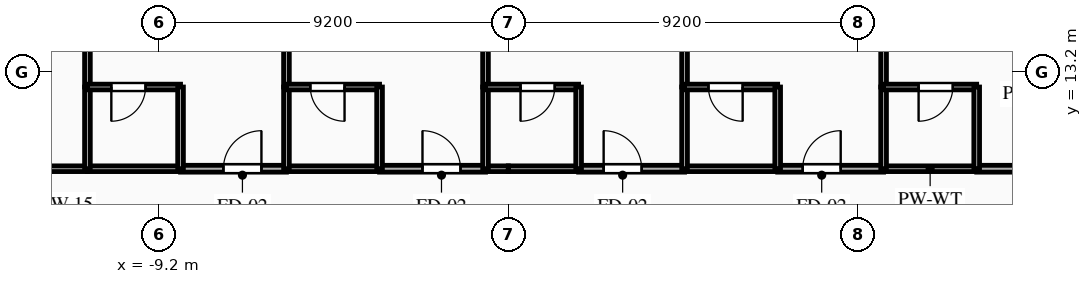
"""IFC4 building model, lengths in metres.
Left out: names, types, materials, properties, quantities, classifications, styles, units other than length and angle.
Written with IfcOpenShell. Run it as: python <this file> out.ifc"""

import sys

from ifc_helpers import new_model, si_unit, direction, frame, frame_2d, origin, place, context, subcontext, project, spatial, rectangle, extrude, element, fill, save


model = new_model("IFC4")
c1 = context("Model", 3, precision=1e-05, world=origin(), true_north=direction((0.0, 1.0)))
c2 = subcontext(c1, "Body", "Model", "MODEL_VIEW")
j1 = project(units=[si_unit("LENGTHUNIT", "METRE"), si_unit("PLANEANGLEUNIT", "RADIAN")], contexts=[c1])
p1 = place(None, origin())
s1 = spatial("IfcSite", under=j1, at=p1, CompositionType="ELEMENT")
p2 = place(p1, origin())
s2 = spatial("IfcBuilding", under=s1, at=p2, CompositionType="ELEMENT")
p3 = place(p2, frame((0.0, 0.0, 144.4)))
s3 = spatial("IfcBuildingStorey", under=s2, at=p3, CompositionType="ELEMENT", Elevation=144.4)
p4 = place(p3, frame((-14.112, 10.65, 0.0), z_axis=(0.0, 0.0, 1.0), x_axis=(1.0, 0.0, 0.0)))
e1 = element("IfcWall", 1, at=p4, inside=s3, PredefinedType="PARTITIONING", context=c2, shape_type="SweptSolid", body=[
    extrude(rectangle(XDim=3.037, YDim=0.15, at=frame_2d((1.519, 0.0))), origin(), (0.0, 0.0, 1.0), 3.04),
])
p5 = place(p4, frame((0.696, 0.0, 0.0)))
e2 = element("IfcOpeningElement", 2, at=p5, cuts=e1, PredefinedType="OPENING", context=c2, shape_type="SweptSolid", body=[
    extrude(rectangle(XDim=0.95, YDim=2.1, at=frame_2d((0.475, 1.05))), frame((0.0, 0.085, 0.0), z_axis=(0.0, -1.0, 0.0), x_axis=(1.0, 0.0, 0.0)), (0.0, 0.0, 1.0), 0.17),
])
p6 = place(p3, frame((-8.625, 10.65, 0.0), z_axis=(0.0, 0.0, 1.0), x_axis=(1.0, 0.0, 0.0)))
e3 = element("IfcWall", 3, at=p6, inside=s3, PredefinedType="PARTITIONING", context=c2, shape_type="SweptSolid", body=[
    extrude(rectangle(XDim=2.787, YDim=0.18, at=frame_2d((1.394, 0.0))), origin(), (0.0, 0.0, 1.0), 3.04),
])
p7 = place(p6, frame((1.129, 0.0, 0.0)))
e4 = element("IfcOpeningElement", 4, at=p7, cuts=e3, PredefinedType="OPENING", context=c2, shape_type="SweptSolid", body=[
    extrude(rectangle(XDim=1.0, YDim=2.15, at=frame_2d((0.5, 1.075))), frame((0.0, 0.1, 0.0), z_axis=(0.0, -1.0, 0.0), x_axis=(1.0, 0.0, 0.0)), (0.0, 0.0, 1.0), 0.2),
])
p8 = place(p3, frame((-11.075, 10.65, 0.0), z_axis=(0.0, 0.0, 1.0), x_axis=(1.0, 0.0, 0.0)))
e5 = element("IfcWall", 5, at=p8, inside=s3, PredefinedType="PLUMBINGWALL", context=c2, shape_type="SweptSolid", body=[
    extrude(rectangle(XDim=2.45, YDim=0.15, at=frame_2d((1.225, 0.0))), origin(), (0.0, 0.0, 1.0), 3.04),
])
p9 = place(p3, frame((-3.388, 10.65, 0.0), z_axis=(0.0, 0.0, 1.0), x_axis=(1.0, 0.0, 0.0)))
e6 = element("IfcWall", 6, at=p9, inside=s3, PredefinedType="PARTITIONING", context=c2, shape_type="SweptSolid", body=[
    extrude(rectangle(XDim=2.788, YDim=0.18, at=frame_2d((1.394, 0.0))), origin(), (0.0, 0.0, 1.0), 3.04),
])
p10 = place(p9, frame((1.129, 0.0, 0.0)))
e7 = element("IfcOpeningElement", 7, at=p10, cuts=e6, PredefinedType="OPENING", context=c2, shape_type="SweptSolid", body=[
    extrude(rectangle(XDim=1.0, YDim=2.15, at=frame_2d((0.5, 1.075))), frame((0.0, 0.1, 0.0), z_axis=(0.0, -1.0, 0.0), x_axis=(1.0, 0.0, 0.0)), (0.0, 0.0, 1.0), 0.2),
])
p11 = place(p3, frame((-5.838, 10.65, 0.0), z_axis=(0.0, 0.0, 1.0), x_axis=(1.0, 0.0, 0.0)))
e8 = element("IfcWall", 8, at=p11, inside=s3, PredefinedType="PLUMBINGWALL", context=c2, shape_type="SweptSolid", body=[
    extrude(rectangle(XDim=2.45, YDim=0.15, at=frame_2d((1.225, 0.0))), origin(), (0.0, 0.0, 1.0), 3.04),
])
p12 = place(p3, frame((-0.6, 10.65, 0.0), z_axis=(0.0, 0.0, 1.0), x_axis=(1.0, 0.0, 0.0)))
e9 = element("IfcWall", 9, at=p12, inside=s3, PredefinedType="PLUMBINGWALL", context=c2, shape_type="SweptSolid", body=[
    extrude(rectangle(XDim=0.6, YDim=0.15, at=frame_2d((0.3, 0.0))), origin(), (0.0, 0.0, 1.0), 3.04),
])
p13 = place(p3, frame((1.85, 10.65, 0.0), z_axis=(0.0, 0.0, 1.0), x_axis=(1.0, 0.0, 0.0)))
e10 = element("IfcWall", 10, at=p13, inside=s3, PredefinedType="PARTITIONING", context=c2, shape_type="SweptSolid", body=[
    extrude(rectangle(XDim=2.788, YDim=0.18, at=frame_2d((1.394, 0.0))), origin(), (0.0, 0.0, 1.0), 3.04),
])
p14 = place(p13, frame((0.658, 0.0, 0.0)))
e11 = element("IfcOpeningElement", 11, at=p14, cuts=e10, PredefinedType="OPENING", context=c2, shape_type="SweptSolid", body=[
    extrude(rectangle(XDim=1.0, YDim=2.15, at=frame_2d((0.5, 1.075))), frame((0.0, 0.1, 0.0), z_axis=(0.0, -1.0, 0.0), x_axis=(1.0, 0.0, 0.0)), (0.0, 0.0, 1.0), 0.2),
])
p15 = place(p3, frame((0.0, 10.65, 0.0), z_axis=(0.0, 0.0, 1.0), x_axis=(1.0, 0.0, 0.0)))
e12 = element("IfcWall", 12, at=p15, inside=s3, PredefinedType="PLUMBINGWALL", context=c2, shape_type="SweptSolid", body=[
    extrude(rectangle(XDim=1.85, YDim=0.15, at=frame_2d((0.925, 0.0))), origin(), (0.0, 0.0, 1.0), 3.04),
])
p16 = place(p3, frame((7.088, 10.65, 0.0), z_axis=(0.0, 0.0, 1.0), x_axis=(1.0, 0.0, 0.0)))
e13 = element("IfcWall", 13, at=p16, inside=s3, PredefinedType="PARTITIONING", context=c2, shape_type="SweptSolid", body=[
    extrude(rectangle(XDim=2.787, YDim=0.18, at=frame_2d((1.394, 0.0))), origin(), (0.0, 0.0, 1.0), 3.04),
])
p17 = place(p16, frame((0.658, 0.0, 0.0)))
e14 = element("IfcOpeningElement", 14, at=p17, cuts=e13, PredefinedType="OPENING", context=c2, shape_type="SweptSolid", body=[
    extrude(rectangle(XDim=1.0, YDim=2.15, at=frame_2d((0.5, 1.075))), frame((0.0, 0.1, 0.0), z_axis=(0.0, -1.0, 0.0), x_axis=(1.0, 0.0, 0.0)), (0.0, 0.0, 1.0), 0.2),
])
p18 = place(p3, frame((4.638, 10.65, 0.0), z_axis=(0.0, 0.0, 1.0), x_axis=(1.0, 0.0, 0.0)))
e15 = element("IfcWall", 15, at=p18, inside=s3, PredefinedType="PLUMBINGWALL", context=c2, shape_type="SweptSolid", body=[
    extrude(rectangle(XDim=2.45, YDim=0.15, at=frame_2d((1.225, 0.0))), origin(), (0.0, 0.0, 1.0), 3.04),
])
p19 = place(p3, frame((12.325, 10.65, 0.0), z_axis=(0.0, 0.0, 1.0), x_axis=(1.0, 0.0, 0.0)))
e16 = element("IfcWall", 16, at=p19, inside=s3, PredefinedType="PARTITIONING", context=c2, shape_type="SweptSolid", body=[
    extrude(rectangle(XDim=2.788, YDim=0.18, at=frame_2d((1.394, 0.0))), origin(), (0.0, 0.0, 1.0), 3.04),
])
p20 = place(p19, frame((1.129, 0.0, 0.0)))
e17 = element("IfcOpeningElement", 17, at=p20, cuts=e16, PredefinedType="OPENING", context=c2, shape_type="SweptSolid", body=[
    extrude(rectangle(XDim=1.0, YDim=2.15, at=frame_2d((0.5, 1.075))), frame((0.0, 0.1, 0.0), z_axis=(0.0, -1.0, 0.0), x_axis=(1.0, 0.0, 0.0)), (0.0, 0.0, 1.0), 0.2),
])
p21 = place(p3, frame((9.875, 10.65, 0.0), z_axis=(0.0, 0.0, 1.0), x_axis=(1.0, 0.0, 0.0)))
e18 = element("IfcWall", 18, at=p21, inside=s3, PredefinedType="PLUMBINGWALL", context=c2, shape_type="SweptSolid", body=[
    extrude(rectangle(XDim=2.45, YDim=0.15, at=frame_2d((1.225, 0.0))), origin(), (0.0, 0.0, 1.0), 3.04),
])
p22 = place(p3, frame((-11.075, 20.4, 0.0), z_axis=(0.0, 0.0, 1.0), x_axis=(0.0, -1.0, 0.0)))
e19 = element("IfcWall", 19, at=p22, inside=s3, PredefinedType="PARTITIONING", context=c2, shape_type="SweptSolid", body=[
    extrude(rectangle(XDim=7.6, YDim=0.15, at=frame_2d((3.8, 0.0))), origin(), (0.0, 0.0, 1.0), 3.04),
])
p23 = place(p3, frame((-11.075, 12.8, 0.0), z_axis=(0.0, 0.0, 1.0), x_axis=(0.0, -1.0, 0.0)))
e20 = element("IfcWall", 20, at=p23, inside=s3, PredefinedType="PLUMBINGWALL", context=c2, shape_type="SweptSolid", body=[
    extrude(rectangle(XDim=2.15, YDim=0.15, at=frame_2d((1.075, 0.0))), origin(), (0.0, 0.0, 1.0), 3.04),
])
p24 = place(p3, frame((-8.625, 12.8, 0.0), z_axis=(0.0, 0.0, 1.0), x_axis=(-1.0, 0.0, 0.0)))
e21 = element("IfcWall", 21, at=p24, inside=s3, PredefinedType="PLUMBINGWALL", context=c2, shape_type="SweptSolid", body=[
    extrude(rectangle(XDim=2.45, YDim=0.15, at=frame_2d((1.225, 0.0))), origin(), (0.0, 0.0, 1.0), 3.04),
])
p25 = place(p24, frame((0.921, 0.0, 0.0)))
e22 = element("IfcOpeningElement", 22, at=p25, cuts=e21, PredefinedType="OPENING", context=c2, shape_type="SweptSolid", body=[
    extrude(rectangle(XDim=0.9, YDim=2.1, at=frame_2d((0.45, 1.05))), frame((0.0, 0.085, 0.0), z_axis=(0.0, -1.0, 0.0), x_axis=(1.0, 0.0, 0.0)), (0.0, 0.0, 1.0), 0.17),
])
p26 = place(p3, frame((-8.625, 10.65, 0.0), z_axis=(0.0, 0.0, 1.0), x_axis=(0.0, 1.0, 0.0)))
e23 = element("IfcWall", 23, at=p26, inside=s3, PredefinedType="PLUMBINGWALL", context=c2, shape_type="SweptSolid", body=[
    extrude(rectangle(XDim=2.15, YDim=0.15, at=frame_2d((1.075, 0.0))), origin(), (0.0, 0.0, 1.0), 3.04),
])
p27 = place(p3, frame((-5.838, 20.4, 0.0), z_axis=(0.0, 0.0, 1.0), x_axis=(0.0, -1.0, 0.0)))
e24 = element("IfcWall", 24, at=p27, inside=s3, PredefinedType="PARTITIONING", context=c2, shape_type="SweptSolid", body=[
    extrude(rectangle(XDim=7.6, YDim=0.15, at=frame_2d((3.8, 0.0))), origin(), (0.0, 0.0, 1.0), 3.04),
])
p28 = place(p3, frame((-5.838, 12.8, 0.0), z_axis=(0.0, 0.0, 1.0), x_axis=(0.0, -1.0, 0.0)))
e25 = element("IfcWall", 25, at=p28, inside=s3, PredefinedType="PLUMBINGWALL", context=c2, shape_type="SweptSolid", body=[
    extrude(rectangle(XDim=2.15, YDim=0.15, at=frame_2d((1.075, 0.0))), origin(), (0.0, 0.0, 1.0), 3.04),
])
p29 = place(p3, frame((-3.388, 12.8, 0.0), z_axis=(0.0, 0.0, 1.0), x_axis=(-1.0, 0.0, 0.0)))
e26 = element("IfcWall", 26, at=p29, inside=s3, PredefinedType="PLUMBINGWALL", context=c2, shape_type="SweptSolid", body=[
    extrude(rectangle(XDim=2.45, YDim=0.15, at=frame_2d((1.225, 0.0))), origin(), (0.0, 0.0, 1.0), 3.04),
])
p30 = place(p29, frame((0.921, 0.0, 0.0)))
e27 = element("IfcOpeningElement", 27, at=p30, cuts=e26, PredefinedType="OPENING", context=c2, shape_type="SweptSolid", body=[
    extrude(rectangle(XDim=0.9, YDim=2.1, at=frame_2d((0.45, 1.05))), frame((0.0, 0.085, 0.0), z_axis=(0.0, -1.0, 0.0), x_axis=(1.0, 0.0, 0.0)), (0.0, 0.0, 1.0), 0.17),
])
p31 = place(p3, frame((-3.388, 10.65, 0.0), z_axis=(0.0, 0.0, 1.0), x_axis=(0.0, 1.0, 0.0)))
e28 = element("IfcWall", 28, at=p31, inside=s3, PredefinedType="PLUMBINGWALL", context=c2, shape_type="SweptSolid", body=[
    extrude(rectangle(XDim=2.15, YDim=0.15, at=frame_2d((1.075, 0.0))), origin(), (0.0, 0.0, 1.0), 3.04),
])
p32 = place(p3, frame((-0.6, 20.4, 0.0), z_axis=(0.0, 0.0, 1.0), x_axis=(0.0, -1.0, 0.0)))
e29 = element("IfcWall", 29, at=p32, inside=s3, PredefinedType="PARTITIONING", context=c2, shape_type="SweptSolid", body=[
    extrude(rectangle(XDim=7.6, YDim=0.15, at=frame_2d((3.8, 0.0))), origin(), (0.0, 0.0, 1.0), 3.04),
])
p33 = place(p3, frame((-0.6, 12.8, 0.0), z_axis=(0.0, 0.0, 1.0), x_axis=(0.0, -1.0, 0.0)))
e30 = element("IfcWall", 30, at=p33, inside=s3, PredefinedType="PLUMBINGWALL", context=c2, shape_type="SweptSolid", body=[
    extrude(rectangle(XDim=2.15, YDim=0.15, at=frame_2d((1.075, 0.0))), origin(), (0.0, 0.0, 1.0), 3.04),
])
p34 = place(p3, frame((1.85, 12.8, 0.0), z_axis=(0.0, 0.0, 1.0), x_axis=(-1.0, 0.0, 0.0)))
e31 = element("IfcWall", 31, at=p34, inside=s3, PredefinedType="PLUMBINGWALL", context=c2, shape_type="SweptSolid", body=[
    extrude(rectangle(XDim=2.45, YDim=0.15, at=frame_2d((1.225, 0.0))), origin(), (0.0, 0.0, 1.0), 3.04),
])
p35 = place(p34, frame((0.629, 0.0, 0.0)))
e32 = element("IfcOpeningElement", 32, at=p35, cuts=e31, PredefinedType="OPENING", context=c2, shape_type="SweptSolid", body=[
    extrude(rectangle(XDim=0.9, YDim=2.1, at=frame_2d((0.45, 1.05))), frame((0.0, 0.085, 0.0), z_axis=(0.0, -1.0, 0.0), x_axis=(1.0, 0.0, 0.0)), (0.0, 0.0, 1.0), 0.17),
])
p36 = place(p3, frame((1.85, 10.65, 0.0), z_axis=(0.0, 0.0, 1.0), x_axis=(0.0, 1.0, 0.0)))
e33 = element("IfcWall", 33, at=p36, inside=s3, PredefinedType="PLUMBINGWALL", context=c2, shape_type="SweptSolid", body=[
    extrude(rectangle(XDim=2.15, YDim=0.15, at=frame_2d((1.075, 0.0))), origin(), (0.0, 0.0, 1.0), 3.04),
])
p37 = place(p3, frame((4.638, 20.4, 0.0), z_axis=(0.0, 0.0, 1.0), x_axis=(0.0, -1.0, 0.0)))
e34 = element("IfcWall", 34, at=p37, inside=s3, PredefinedType="PARTITIONING", context=c2, shape_type="SweptSolid", body=[
    extrude(rectangle(XDim=7.6, YDim=0.15, at=frame_2d((3.8, 0.0))), origin(), (0.0, 0.0, 1.0), 3.04),
])
p38 = place(p3, frame((4.638, 12.8, 0.0), z_axis=(0.0, 0.0, 1.0), x_axis=(0.0, -1.0, 0.0)))
e35 = element("IfcWall", 35, at=p38, inside=s3, PredefinedType="PLUMBINGWALL", context=c2, shape_type="SweptSolid", body=[
    extrude(rectangle(XDim=2.15, YDim=0.15, at=frame_2d((1.075, 0.0))), origin(), (0.0, 0.0, 1.0), 3.04),
])
p39 = place(p3, frame((7.088, 12.8, 0.0), z_axis=(0.0, 0.0, 1.0), x_axis=(-1.0, 0.0, 0.0)))
e36 = element("IfcWall", 36, at=p39, inside=s3, PredefinedType="PLUMBINGWALL", context=c2, shape_type="SweptSolid", body=[
    extrude(rectangle(XDim=2.45, YDim=0.15, at=frame_2d((1.225, 0.0))), origin(), (0.0, 0.0, 1.0), 3.04),
])
p40 = place(p39, frame((0.921, 0.0, 0.0)))
e37 = element("IfcOpeningElement", 37, at=p40, cuts=e36, PredefinedType="OPENING", context=c2, shape_type="SweptSolid", body=[
    extrude(rectangle(XDim=0.9, YDim=2.1, at=frame_2d((0.45, 1.05))), frame((0.0, 0.085, 0.0), z_axis=(0.0, -1.0, 0.0), x_axis=(1.0, 0.0, 0.0)), (0.0, 0.0, 1.0), 0.17),
])
p41 = place(p3, frame((7.088, 10.65, 0.0), z_axis=(0.0, 0.0, 1.0), x_axis=(0.0, 1.0, 0.0)))
e38 = element("IfcWall", 38, at=p41, inside=s3, PredefinedType="PLUMBINGWALL", context=c2, shape_type="SweptSolid", body=[
    extrude(rectangle(XDim=2.15, YDim=0.15, at=frame_2d((1.075, 0.0))), origin(), (0.0, 0.0, 1.0), 3.04),
])
p42 = place(p3, frame((9.875, 20.4, 0.0), z_axis=(0.0, 0.0, 1.0), x_axis=(0.0, -1.0, 0.0)))
e39 = element("IfcWall", 39, at=p42, inside=s3, PredefinedType="PARTITIONING", context=c2, shape_type="SweptSolid", body=[
    extrude(rectangle(XDim=7.6, YDim=0.15, at=frame_2d((3.8, 0.0))), origin(), (0.0, 0.0, 1.0), 3.04),
])
p43 = place(p3, frame((9.875, 12.8, 0.0), z_axis=(0.0, 0.0, 1.0), x_axis=(0.0, -1.0, 0.0)))
e40 = element("IfcWall", 40, at=p43, inside=s3, PredefinedType="PLUMBINGWALL", context=c2, shape_type="SweptSolid", body=[
    extrude(rectangle(XDim=2.15, YDim=0.15, at=frame_2d((1.075, 0.0))), origin(), (0.0, 0.0, 1.0), 3.04),
])
p44 = place(p3, frame((12.325, 12.8, 0.0), z_axis=(0.0, 0.0, 1.0), x_axis=(-1.0, 0.0, 0.0)))
e41 = element("IfcWall", 41, at=p44, inside=s3, PredefinedType="PLUMBINGWALL", context=c2, shape_type="SweptSolid", body=[
    extrude(rectangle(XDim=2.45, YDim=0.15, at=frame_2d((1.225, 0.0))), origin(), (0.0, 0.0, 1.0), 3.04),
])
p45 = place(p44, frame((0.629, 0.0, 0.0)))
e42 = element("IfcOpeningElement", 42, at=p45, cuts=e41, PredefinedType="OPENING", context=c2, shape_type="SweptSolid", body=[
    extrude(rectangle(XDim=0.9, YDim=2.1, at=frame_2d((0.45, 1.05))), frame((0.0, 0.085, 0.0), z_axis=(0.0, -1.0, 0.0), x_axis=(1.0, 0.0, 0.0)), (0.0, 0.0, 1.0), 0.17),
])
p46 = place(p3, frame((12.325, 10.65, 0.0), z_axis=(0.0, 0.0, 1.0), x_axis=(0.0, 1.0, 0.0)))
e43 = element("IfcWall", 43, at=p46, inside=s3, PredefinedType="PLUMBINGWALL", context=c2, shape_type="SweptSolid", body=[
    extrude(rectangle(XDim=2.15, YDim=0.15, at=frame_2d((1.075, 0.0))), origin(), (0.0, 0.0, 1.0), 3.04),
])
p47 = place(p7, origin())
e44 = element("IfcDoor", 44, at=p47, inside=s3, OperationType="SINGLE_SWING_RIGHT", PredefinedType="DOOR", context=c2, shape_type="SweptSolid", body=[
    extrude(rectangle(XDim=1.0, YDim=2.15, at=frame_2d((0.5, 1.075))), frame((0.0, 0.025, 0.0), z_axis=(0.0, -1.0, 0.0), x_axis=(1.0, 0.0, 0.0)), (0.0, 0.0, 1.0), 0.05),
])
fill(e4, e44)
p48 = place(p10, origin())
e45 = element("IfcDoor", 45, at=p48, inside=s3, OperationType="SINGLE_SWING_LEFT", PredefinedType="DOOR", context=c2, shape_type="SweptSolid", body=[
    extrude(rectangle(XDim=1.0, YDim=2.15, at=frame_2d((0.5, 1.075))), frame((0.0, 0.025, 0.0), z_axis=(0.0, -1.0, 0.0), x_axis=(1.0, 0.0, 0.0)), (0.0, 0.0, 1.0), 0.05),
])
fill(e7, e45)
p49 = place(p14, origin())
e46 = element("IfcDoor", 46, at=p49, inside=s3, OperationType="SINGLE_SWING_LEFT", PredefinedType="DOOR", context=c2, shape_type="SweptSolid", body=[
    extrude(rectangle(XDim=1.0, YDim=2.15, at=frame_2d((0.5, 1.075))), frame((0.0, 0.025, 0.0), z_axis=(0.0, -1.0, 0.0), x_axis=(1.0, 0.0, 0.0)), (0.0, 0.0, 1.0), 0.05),
])
fill(e11, e46)
p50 = place(p17, origin())
e47 = element("IfcDoor", 47, at=p50, inside=s3, OperationType="SINGLE_SWING_RIGHT", PredefinedType="DOOR", context=c2, shape_type="SweptSolid", body=[
    extrude(rectangle(XDim=1.0, YDim=2.15, at=frame_2d((0.5, 1.075))), frame((0.0, 0.025, 0.0), z_axis=(0.0, -1.0, 0.0), x_axis=(1.0, 0.0, 0.0)), (0.0, 0.0, 1.0), 0.05),
])
fill(e14, e47)
p51 = place(p25, origin())
e48 = element("IfcDoor", 48, at=p51, inside=s3, OperationType="SINGLE_SWING_RIGHT", PredefinedType="DOOR", context=c2, shape_type="SweptSolid", body=[
    extrude(rectangle(XDim=0.9, YDim=2.1, at=frame_2d((0.45, 1.05))), frame((0.0, 0.025, 0.0), z_axis=(0.0, -1.0, 0.0), x_axis=(1.0, 0.0, 0.0)), (0.0, 0.0, 1.0), 0.05),
])
fill(e22, e48)
p52 = place(p30, origin())
e49 = element("IfcDoor", 49, at=p52, inside=s3, OperationType="SINGLE_SWING_LEFT", PredefinedType="DOOR", context=c2, shape_type="SweptSolid", body=[
    extrude(rectangle(XDim=0.9, YDim=2.1, at=frame_2d((0.45, 1.05))), frame((0.0, 0.025, 0.0), z_axis=(0.0, -1.0, 0.0), x_axis=(1.0, 0.0, 0.0)), (0.0, 0.0, 1.0), 0.05),
])
fill(e27, e49)
p53 = place(p35, origin())
e50 = element("IfcDoor", 50, at=p53, inside=s3, OperationType="SINGLE_SWING_RIGHT", PredefinedType="DOOR", context=c2, shape_type="SweptSolid", body=[
    extrude(rectangle(XDim=0.9, YDim=2.1, at=frame_2d((0.45, 1.05))), frame((0.0, 0.025, 0.0), z_axis=(0.0, -1.0, 0.0), x_axis=(1.0, 0.0, 0.0)), (0.0, 0.0, 1.0), 0.05),
])
fill(e32, e50)
p54 = place(p40, origin())
e51 = element("IfcDoor", 51, at=p54, inside=s3, OperationType="SINGLE_SWING_LEFT", PredefinedType="DOOR", context=c2, shape_type="SweptSolid", body=[
    extrude(rectangle(XDim=0.9, YDim=2.1, at=frame_2d((0.45, 1.05))), frame((0.0, 0.025, 0.0), z_axis=(0.0, -1.0, 0.0), x_axis=(1.0, 0.0, 0.0)), (0.0, 0.0, 1.0), 0.05),
])
fill(e37, e51)
p55 = place(p45, origin())
e52 = element("IfcDoor", 52, at=p55, inside=s3, OperationType="SINGLE_SWING_RIGHT", PredefinedType="DOOR", context=c2, shape_type="SweptSolid", body=[
    extrude(rectangle(XDim=0.9, YDim=2.1, at=frame_2d((0.45, 1.05))), frame((0.0, 0.025, 0.0), z_axis=(0.0, -1.0, 0.0), x_axis=(1.0, 0.0, 0.0)), (0.0, 0.0, 1.0), 0.05),
])
fill(e42, e52)
save(model, sys.argv[1])
